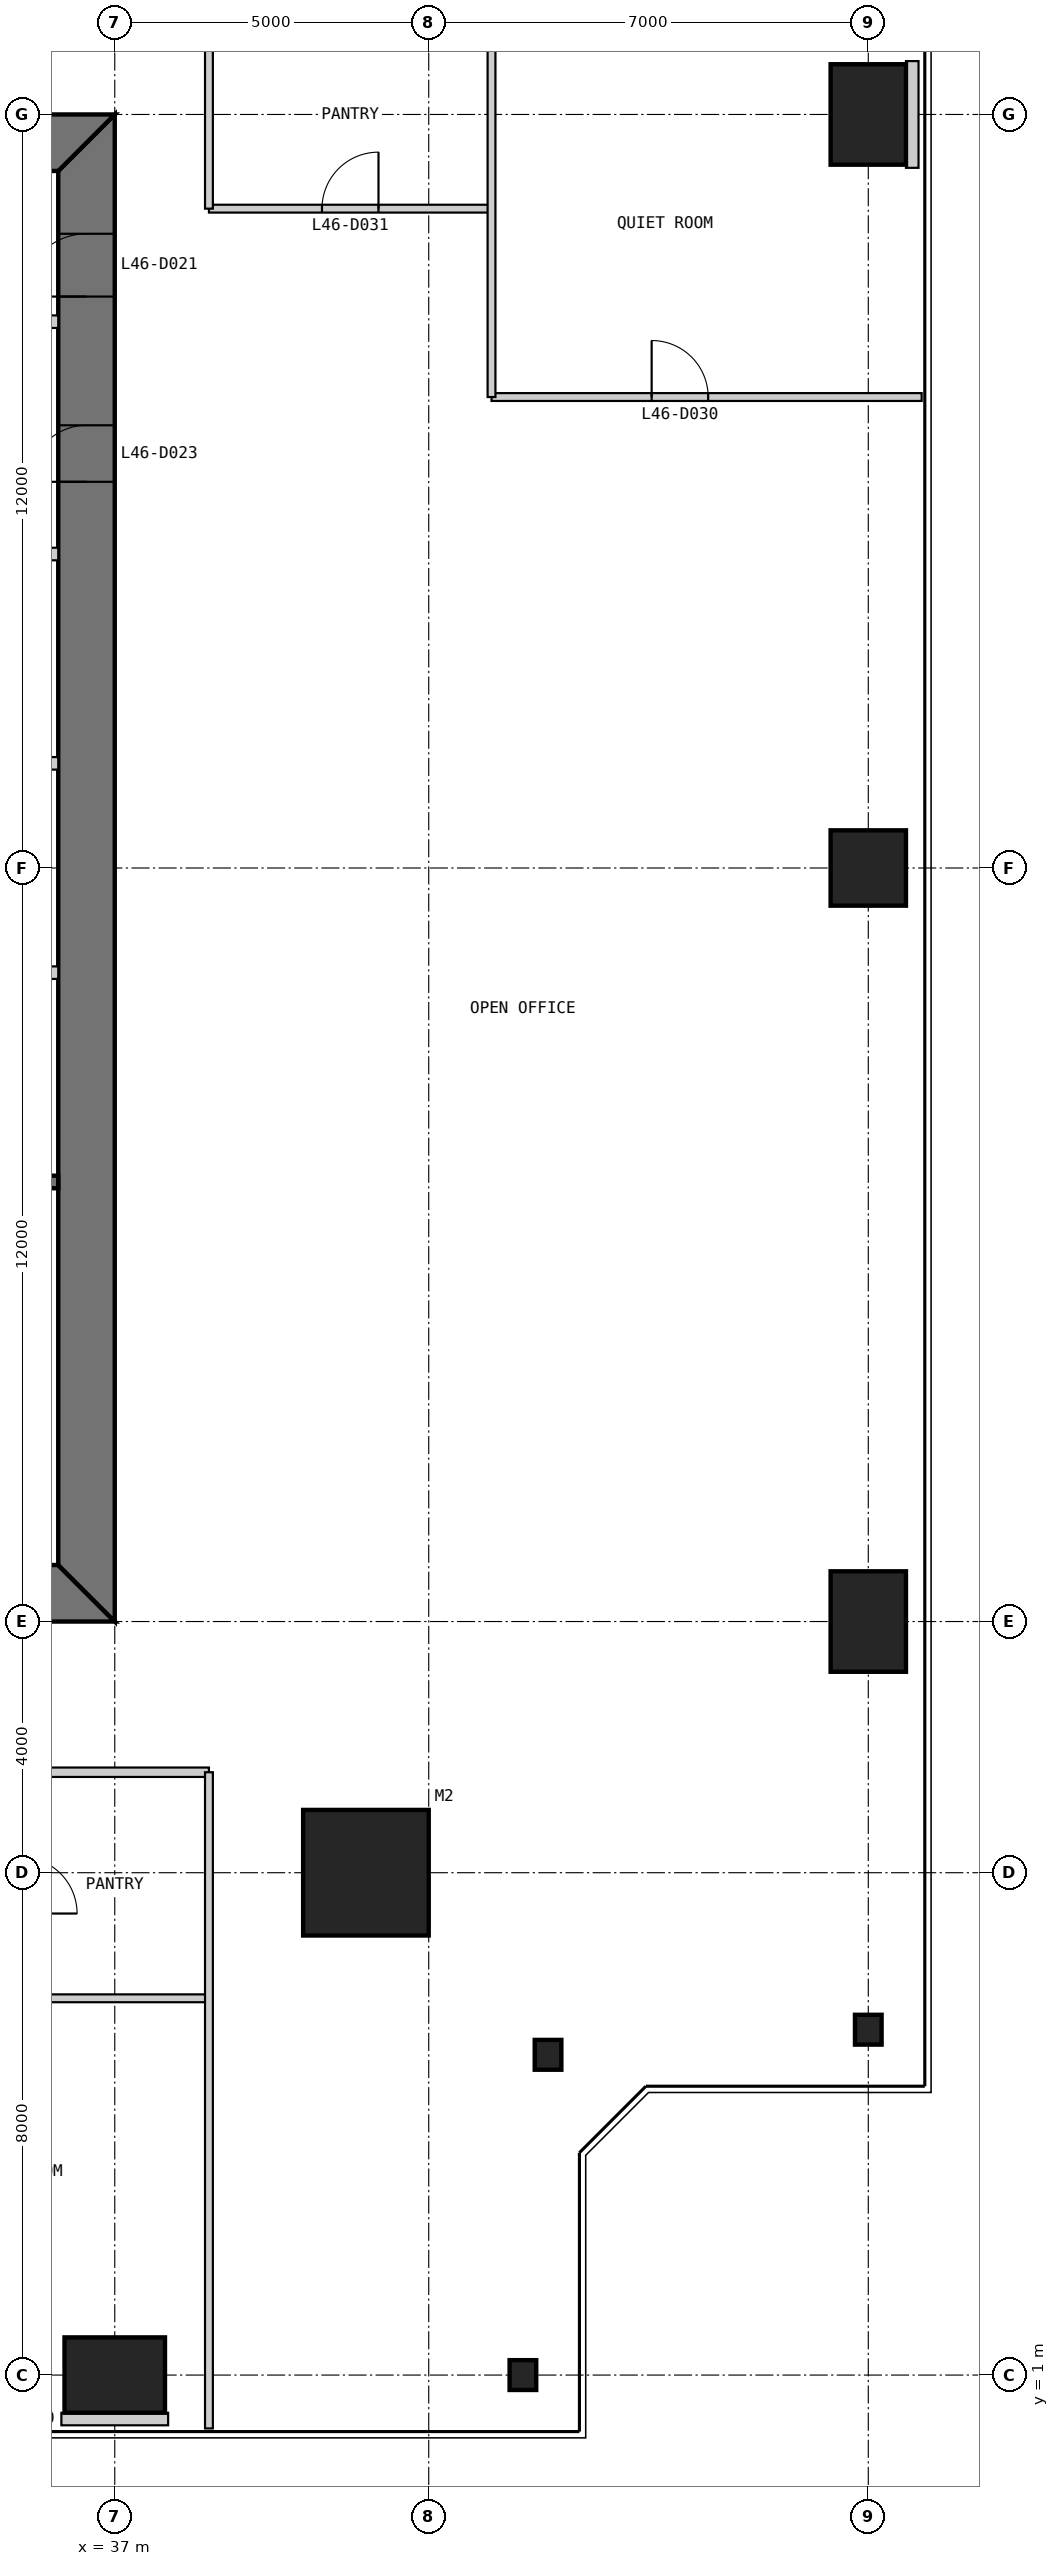
"""IFC4 building model, lengths in metres.
Left out: names, types, materials, properties, quantities, classifications, styles, units other than length and angle.
Written with IfcOpenShell. Run it as: python <this file> out.ifc"""

import sys

from ifc_helpers import new_model, si_unit, direction, frame, frame_2d, origin, origin_2d, place, context, subcontext, project, spatial, polyline, rectangle, i_section, outline, extrude, element, fill, save


model = new_model("IFC4")
c1 = context("Model", 3, precision=1e-05, world=origin(), true_north=direction((0.0, 1.0)))
c2 = subcontext(c1, "Body", "Model", "MODEL_VIEW")
j1 = project(units=[si_unit("LENGTHUNIT", "METRE"), si_unit("PLANEANGLEUNIT", "RADIAN")], contexts=[c1])
p1 = place(None, origin())
s1 = spatial("IfcSite", under=j1, at=p1, CompositionType="ELEMENT")
p2 = place(p1, origin())
s2 = spatial("IfcBuilding", under=s1, at=p2, CompositionType="ELEMENT")
p3 = place(p2, frame((0.0, 0.0, 197.8)))
s3 = spatial("IfcBuildingStorey", under=s2, at=p3, CompositionType="ELEMENT", Elevation=197.8)
p4 = place(p3, frame((41.0, 9.0, 0.0), z_axis=(0.0, 0.0, 1.0), x_axis=(1.0, 0.0, 0.0)))
e1 = element("IfcColumn", 1, at=p4, inside=s3, PredefinedType="COLUMN", context=c2, shape_type="SweptSolid", body=[
    extrude(rectangle(XDim=2.0, YDim=2.0, at=origin_2d()), origin(), (0.0, 0.0, 1.0), 4.0),
])
p5 = place(p3, frame((37.0, 1.0, 0.0), z_axis=(0.0, 0.0, 1.0), x_axis=(1.0, 0.0, 0.0)))
e2 = element("IfcColumn", 2, at=p5, inside=s3, PredefinedType="COLUMN", context=c2, shape_type="SweptSolid", body=[
    extrude(rectangle(XDim=1.6, YDim=1.2, at=origin_2d()), origin(), (0.0, 0.0, 1.0), 4.0),
])
for number, where, z_axis, x_axis in (
    (3, (43.5, 1.0, 0.0), (0.0, 0.0, 1.0), (1.0, 0.0, 0.0)),
    (4, (43.9, 6.1, 0.0), (0.0, 0.0, 1.0), (1.0, 0.0, 0.0)),
    (5, (49.0, 6.5, 0.0), (0.0, 0.0, 1.0), (1.0, 0.0, 0.0)),
):
    element("IfcColumn", number, at=place(p3, frame(where, z_axis=z_axis, x_axis=x_axis)), inside=s3, PredefinedType="COLUMN", context=c2, shape_type="SweptSolid", body=[
        extrude(i_section(OverallWidth=0.424, OverallDepth=0.475, WebThickness=0.048, FlangeThickness=0.077, at=origin_2d()), origin(), (0.0, 0.0, 1.0), 4.0),
    ])
p6 = place(p3, frame((49.0, 13.0, 0.0), z_axis=(0.0, 0.0, 1.0), x_axis=(1.0, 0.0, 0.0)))
e6 = element("IfcColumn", 6, at=p6, inside=s3, PredefinedType="COLUMN", context=c2, shape_type="SweptSolid", body=[
    extrude(rectangle(XDim=1.2, YDim=1.6, at=origin_2d()), origin(), (0.0, 0.0, 1.0), 4.0),
])
p7 = place(p3, frame((49.0, 25.0, 0.0), z_axis=(0.0, 0.0, 1.0), x_axis=(1.0, 0.0, 0.0)))
e7 = element("IfcColumn", 7, at=p7, inside=s3, PredefinedType="COLUMN", context=c2, shape_type="SweptSolid", body=[
    extrude(rectangle(XDim=1.2, YDim=1.2, at=origin_2d()), origin(), (0.0, 0.0, 1.0), 4.0),
])
p8 = place(p3, frame((49.0, 37.0, 0.0), z_axis=(0.0, 0.0, 1.0), x_axis=(1.0, 0.0, 0.0)))
e8 = element("IfcColumn", 8, at=p8, inside=s3, PredefinedType="COLUMN", context=c2, shape_type="SweptSolid", body=[
    extrude(rectangle(XDim=1.2, YDim=1.6, at=origin_2d()), origin(), (0.0, 0.0, 1.0), 4.0),
])
p9 = place(p3, frame((13.0, 13.45, 0.0), z_axis=(0.0, 0.0, 1.0), x_axis=(1.0, 0.0, 0.0)))
e9 = element("IfcWall", 9, at=p9, inside=s3, PredefinedType="SHEAR", context=c2, shape_type="SweptSolid", body=[
    extrude(outline(polyline([(0.0, -0.45), (24.0, -0.45), (23.1, 0.45), (0.9, 0.45), (0.0, -0.45)])), origin(), (0.0, 0.0, 1.0), 4.0),
])
p10 = place(p9, frame((4.9, 0.0, 0.0)))
e10 = element("IfcOpeningElement", 10, at=p10, cuts=e9, PredefinedType="OPENING", context=c2, shape_type="SweptSolid", body=[
    extrude(rectangle(XDim=1.0, YDim=2.2, at=frame_2d((0.5, 1.1))), frame((0.0, 0.46, 0.0), z_axis=(0.0, -1.0, 0.0), x_axis=(1.0, 0.0, 0.0)), (0.0, 0.0, 1.0), 0.92),
])
p11 = place(p9, frame((8.9, 0.0, 0.0)))
e11 = element("IfcOpeningElement", 11, at=p11, cuts=e9, PredefinedType="OPENING", context=c2, shape_type="SweptSolid", body=[
    extrude(rectangle(XDim=1.1, YDim=2.2, at=frame_2d((0.55, 1.1))), frame((0.0, 0.46, 0.0), z_axis=(0.0, -1.0, 0.0), x_axis=(1.0, 0.0, 0.0)), (0.0, 0.0, 1.0), 0.92),
])
p12 = place(p9, frame((15.05, 0.0, 0.0)))
e12 = element("IfcOpeningElement", 12, at=p12, cuts=e9, PredefinedType="OPENING", context=c2, shape_type="SweptSolid", body=[
    extrude(rectangle(XDim=0.9, YDim=2.2, at=frame_2d((0.45, 1.1))), frame((0.0, 0.46, 0.0), z_axis=(0.0, -1.0, 0.0), x_axis=(1.0, 0.0, 0.0)), (0.0, 0.0, 1.0), 0.92),
])
p13 = place(p9, frame((17.9, 0.0, 0.0)))
e13 = element("IfcOpeningElement", 13, at=p13, cuts=e9, PredefinedType="OPENING", context=c2, shape_type="SweptSolid", body=[
    extrude(rectangle(XDim=1.0, YDim=2.2, at=frame_2d((0.5, 1.1))), frame((0.0, 0.46, 0.0), z_axis=(0.0, -1.0, 0.0), x_axis=(1.0, 0.0, 0.0)), (0.0, 0.0, 1.0), 0.92),
])
p14 = place(p9, frame((21.4, 0.0, 0.0)))
e14 = element("IfcOpeningElement", 14, at=p14, cuts=e9, PredefinedType="OPENING", context=c2, shape_type="SweptSolid", body=[
    extrude(rectangle(XDim=1.0, YDim=2.2, at=frame_2d((0.5, 1.1))), frame((0.0, 0.46, 0.0), z_axis=(0.0, -1.0, 0.0), x_axis=(1.0, 0.0, 0.0)), (0.0, 0.0, 1.0), 0.92),
])
p15 = place(p3, frame((36.55, 13.9, 0.0), z_axis=(0.0, 0.0, 1.0), x_axis=(0.0, 1.0, 0.0)))
e15 = element("IfcWall", 15, at=p15, inside=s3, PredefinedType="SHEAR", context=c2, shape_type="SweptSolid", body=[
    extrude(outline(polyline([(-0.9, -0.45), (23.1, -0.45), (22.2, 0.45), (0.0, 0.45), (-0.9, -0.45)])), origin(), (0.0, 0.0, 1.0), 4.0),
])
p16 = place(p15, frame((20.2, 0.0, 0.0)))
e16 = element("IfcOpeningElement", 16, at=p16, cuts=e15, PredefinedType="OPENING", context=c2, shape_type="SweptSolid", body=[
    extrude(rectangle(XDim=1.0, YDim=2.2, at=frame_2d((0.5, 1.1))), frame((0.0, 0.46, 0.0), z_axis=(0.0, -1.0, 0.0), x_axis=(1.0, 0.0, 0.0)), (0.0, 0.0, 1.0), 0.92),
])
p17 = place(p15, frame((17.25, 0.0, 0.0)))
e17 = element("IfcOpeningElement", 17, at=p17, cuts=e15, PredefinedType="OPENING", context=c2, shape_type="SweptSolid", body=[
    extrude(rectangle(XDim=0.9, YDim=2.2, at=frame_2d((0.45, 1.1))), frame((0.0, 0.46, 0.0), z_axis=(0.0, -1.0, 0.0), x_axis=(1.0, 0.0, 0.0)), (0.0, 0.0, 1.0), 0.92),
])
p18 = place(p3, frame((37.0, 36.55, 0.0), z_axis=(0.0, 0.0, 1.0), x_axis=(-1.0, 0.0, 0.0)))
e18 = element("IfcWall", 18, at=p18, inside=s3, PredefinedType="SHEAR", context=c2, shape_type="SweptSolid", body=[
    extrude(outline(polyline([(0.0, -0.45), (24.0, -0.45), (23.1, 0.45), (0.9, 0.45), (0.0, -0.45)])), origin(), (0.0, 0.0, 1.0), 4.0),
])
p19 = place(p18, frame((4.9, 0.0, 0.0)))
e19 = element("IfcOpeningElement", 19, at=p19, cuts=e18, PredefinedType="OPENING", context=c2, shape_type="SweptSolid", body=[
    extrude(rectangle(XDim=1.0, YDim=2.2, at=frame_2d((0.5, 1.1))), frame((0.0, 0.46, 0.0), z_axis=(0.0, -1.0, 0.0), x_axis=(1.0, 0.0, 0.0)), (0.0, 0.0, 1.0), 0.92),
])
p20 = place(p18, frame((8.9, 0.0, 0.0)))
e20 = element("IfcOpeningElement", 20, at=p20, cuts=e18, PredefinedType="OPENING", context=c2, shape_type="SweptSolid", body=[
    extrude(rectangle(XDim=1.1, YDim=2.2, at=frame_2d((0.55, 1.1))), frame((0.0, 0.46, 0.0), z_axis=(0.0, -1.0, 0.0), x_axis=(1.0, 0.0, 0.0)), (0.0, 0.0, 1.0), 0.92),
])
p21 = place(p18, frame((15.05, 0.0, 0.0)))
e21 = element("IfcOpeningElement", 21, at=p21, cuts=e18, PredefinedType="OPENING", context=c2, shape_type="SweptSolid", body=[
    extrude(rectangle(XDim=0.9, YDim=2.2, at=frame_2d((0.45, 1.1))), frame((0.0, 0.46, 0.0), z_axis=(0.0, -1.0, 0.0), x_axis=(1.0, 0.0, 0.0)), (0.0, 0.0, 1.0), 0.92),
])
p22 = place(p18, frame((17.9, 0.0, 0.0)))
e22 = element("IfcOpeningElement", 22, at=p22, cuts=e18, PredefinedType="OPENING", context=c2, shape_type="SweptSolid", body=[
    extrude(rectangle(XDim=1.0, YDim=2.2, at=frame_2d((0.5, 1.1))), frame((0.0, 0.46, 0.0), z_axis=(0.0, -1.0, 0.0), x_axis=(1.0, 0.0, 0.0)), (0.0, 0.0, 1.0), 0.92),
])
p23 = place(p18, frame((21.4, 0.0, 0.0)))
e23 = element("IfcOpeningElement", 23, at=p23, cuts=e18, PredefinedType="OPENING", context=c2, shape_type="SweptSolid", body=[
    extrude(rectangle(XDim=1.0, YDim=2.2, at=frame_2d((0.5, 1.1))), frame((0.0, 0.46, 0.0), z_axis=(0.0, -1.0, 0.0), x_axis=(1.0, 0.0, 0.0)), (0.0, 0.0, 1.0), 0.92),
])
p24 = place(p3, frame((20.3, 20.0, 0.0), z_axis=(0.0, 0.0, 1.0), x_axis=(1.0, 0.0, 0.0)))
e24 = element("IfcWall", 24, at=p24, inside=s3, PredefinedType="SOLIDWALL", context=c2, shape_type="SweptSolid", body=[
    extrude(rectangle(XDim=15.8, YDim=0.2, at=frame_2d((7.9, 0.0))), origin(), (0.0, 0.0, 1.0), 3.8),
])
for number, where, z_axis, x_axis in (
    (25, (36.1, 30.0, 0.0), (0.0, 0.0, 1.0), (-1.0, 0.0, 0.0)),
    (26, (36.1, 26.667, 0.0), (0.0, 0.0, 1.0), (-1.0, 0.0, 0.0)),
    (27, (36.1, 23.333, 0.0), (0.0, 0.0, 1.0), (-1.0, 0.0, 0.0)),
    (28, (36.1, 33.7, 0.0), (0.0, 0.0, 1.0), (-1.0, 0.0, 0.0)),
):
    element("IfcWall", number, at=place(p3, frame(where, z_axis=z_axis, x_axis=x_axis)), inside=s3, PredefinedType="PARTITIONING", context=c2, shape_type="SweptSolid", body=[
        extrude(rectangle(XDim=2.8, YDim=0.2, at=frame_2d((1.4, 0.0))), origin(), (0.0, 0.0, 1.0), 3.8),
    ])
p25 = place(p3, frame((10.6, 10.6, 0.0), z_axis=(0.0, 0.0, 1.0), x_axis=(1.0, 0.0, 0.0)))
e29 = element("IfcWall", 29, at=p25, inside=s3, PredefinedType="PARTITIONING", context=c2, shape_type="SweptSolid", body=[
    extrude(rectangle(XDim=27.9, YDim=0.15, at=frame_2d((13.95, 0.0))), origin(), (0.0, 0.0, 1.0), 3.85),
])
p26 = place(p25, frame((4.15, 0.0, 0.0)))
e30 = element("IfcOpeningElement", 30, at=p26, cuts=e29, PredefinedType="OPENING", context=c2, shape_type="SweptSolid", body=[
    extrude(rectangle(XDim=1.0, YDim=2.2, at=frame_2d((0.5, 1.1))), frame((0.0, 0.085, 0.0), z_axis=(0.0, -1.0, 0.0), x_axis=(1.0, 0.0, 0.0)), (0.0, 0.0, 1.0), 0.17),
])
p27 = place(p25, frame((23.65, 0.0, 0.0)))
e31 = element("IfcOpeningElement", 31, at=p27, cuts=e29, PredefinedType="OPENING", context=c2, shape_type="SweptSolid", body=[
    extrude(rectangle(XDim=1.0, YDim=2.2, at=frame_2d((0.5, 1.1))), frame((0.0, 0.085, 0.0), z_axis=(0.0, -1.0, 0.0), x_axis=(1.0, 0.0, 0.0)), (0.0, 0.0, 1.0), 0.17),
])
p28 = place(p25, frame((1.15, 0.0, 0.0)))
e32 = element("IfcOpeningElement", 32, at=p28, cuts=e29, PredefinedType="OPENING", context=c2, shape_type="SweptSolid", body=[
    extrude(rectangle(XDim=1.0, YDim=2.2, at=frame_2d((0.5, 1.1))), frame((0.0, 0.085, 0.0), z_axis=(0.0, -1.0, 0.0), x_axis=(1.0, 0.0, 0.0)), (0.0, 0.0, 1.0), 0.17),
])
p29 = place(p3, frame((32.5, 7.0, 0.0), z_axis=(0.0, 0.0, 1.0), x_axis=(1.0, 0.0, 0.0)))
e33 = element("IfcWall", 33, at=p29, inside=s3, PredefinedType="PARTITIONING", context=c2, shape_type="SweptSolid", body=[
    extrude(rectangle(XDim=6.0, YDim=0.125, at=frame_2d((3.0, 0.0))), origin(), (0.0, 0.0, 1.0), 3.85),
])
p30 = place(p3, frame((38.5, 0.15, 0.0), z_axis=(0.0, 0.0, 1.0), x_axis=(0.0, 1.0, 0.0)))
e34 = element("IfcWall", 34, at=p30, inside=s3, PredefinedType="PARTITIONING", context=c2, shape_type="SweptSolid", body=[
    extrude(rectangle(XDim=10.45, YDim=0.125, at=frame_2d((5.225, 0.0))), origin(), (0.0, 0.0, 1.0), 3.85),
])
p31 = place(p3, frame((49.85, 32.5, 0.0), z_axis=(0.0, 0.0, 1.0), x_axis=(-1.0, 0.0, 0.0)))
e35 = element("IfcWall", 35, at=p31, inside=s3, PredefinedType="PARTITIONING", context=c2, shape_type="SweptSolid", body=[
    extrude(rectangle(XDim=6.85, YDim=0.125, at=frame_2d((3.425, 0.0))), origin(), (0.0, 0.0, 1.0), 3.85),
])
p32 = place(p31, frame((3.4, 0.0, 0.0)))
e36 = element("IfcOpeningElement", 36, at=p32, cuts=e35, PredefinedType="OPENING", context=c2, shape_type="SweptSolid", body=[
    extrude(rectangle(XDim=0.9, YDim=2.2, at=frame_2d((0.45, 1.1))), frame((0.0, 0.073, 0.0), z_axis=(0.0, -1.0, 0.0), x_axis=(1.0, 0.0, 0.0)), (0.0, 0.0, 1.0), 0.145),
])
p33 = place(p3, frame((43.0, 35.5, 0.0), z_axis=(0.0, 0.0, 1.0), x_axis=(-1.0, 0.0, 0.0)))
e37 = element("IfcWall", 37, at=p33, inside=s3, PredefinedType="PARTITIONING", context=c2, shape_type="SweptSolid", body=[
    extrude(rectangle(XDim=4.5, YDim=0.125, at=frame_2d((2.25, 0.0))), origin(), (0.0, 0.0, 1.0), 3.85),
])
p34 = place(p33, frame((1.8, 0.0, 0.0)))
e38 = element("IfcOpeningElement", 38, at=p34, cuts=e37, PredefinedType="OPENING", context=c2, shape_type="SweptSolid", body=[
    extrude(rectangle(XDim=0.9, YDim=2.2, at=frame_2d((0.45, 1.1))), frame((0.0, 0.073, 0.0), z_axis=(0.0, -1.0, 0.0), x_axis=(1.0, 0.0, 0.0)), (0.0, 0.0, 1.0), 0.145),
])
p35 = place(p3, frame((43.0, 32.5, 0.0), z_axis=(0.0, 0.0, 1.0), x_axis=(0.0, 1.0, 0.0)))
e39 = element("IfcWall", 39, at=p35, inside=s3, PredefinedType="PARTITIONING", context=c2, shape_type="SweptSolid", body=[
    extrude(rectangle(XDim=6.0, YDim=0.125, at=frame_2d((3.0, 0.0))), origin(), (0.0, 0.0, 1.0), 3.238),
])
p36 = place(p3, frame((38.5, 35.5, 0.0), z_axis=(0.0, 0.0, 1.0), x_axis=(0.0, 1.0, 0.0)))
e40 = element("IfcWall", 40, at=p36, inside=s3, PredefinedType="PARTITIONING", context=c2, shape_type="SweptSolid", body=[
    extrude(rectangle(XDim=3.0, YDim=0.125, at=frame_2d((1.5, 0.0))), origin(), (0.0, 0.0, 1.0), 3.85),
])
for number, where, z_axis, x_axis in (
    (41, (37.0, 0.2, 0.0), (0.0, 0.0, 1.0), (0.0, 1.0, 0.0)),
    (42, (49.8, 37.0, 0.0), (0.0, 0.0, 1.0), (-1.0, 0.0, 0.0)),
):
    element("IfcWall", number, at=place(p3, frame(where, z_axis=z_axis, x_axis=x_axis)), inside=s3, PredefinedType="PARTITIONING", context=c2, shape_type="SweptSolid", body=[
        extrude(rectangle(XDim=0.2, YDim=1.7, at=frame_2d((0.1, 0.0))), origin(), (0.0, 0.0, 1.0), 3.85),
    ])
p37 = place(p16, origin())
e43 = element("IfcDoor", 43, at=p37, inside=s3, OperationType="SINGLE_SWING_LEFT", PredefinedType="DOOR", context=c2, shape_type="SweptSolid", body=[
    extrude(rectangle(XDim=1.0, YDim=2.2, at=frame_2d((0.5, 1.1))), frame((0.0, 0.025, 0.0), z_axis=(0.0, -1.0, 0.0), x_axis=(1.0, 0.0, 0.0)), (0.0, 0.0, 1.0), 0.05),
    extrude(outline(polyline([(0.0, 0.0), (0.04, 0.0), (0.04, 2.16), (0.96, 2.16), (0.96, 0.0), (1.0, 0.0), (1.0, 2.2), (0.0, 2.2), (0.0, 0.0)])), frame((0.0, 0.3, 0.0), z_axis=(0.0, -1.0, 0.0), x_axis=(1.0, 0.0, 0.0)), (0.0, 0.0, 1.0), 0.6),
])
fill(e16, e43)
p38 = place(p17, origin())
e44 = element("IfcDoor", 44, at=p38, inside=s3, OperationType="SINGLE_SWING_LEFT", PredefinedType="DOOR", context=c2, shape_type="SweptSolid", body=[
    extrude(rectangle(XDim=0.9, YDim=2.2, at=frame_2d((0.45, 1.1))), frame((0.0, 0.025, 0.0), z_axis=(0.0, -1.0, 0.0), x_axis=(1.0, 0.0, 0.0)), (0.0, 0.0, 1.0), 0.05),
    extrude(outline(polyline([(0.0, 0.0), (0.04, 0.0), (0.04, 2.16), (0.86, 2.16), (0.86, 0.0), (0.9, 0.0), (0.9, 2.2), (0.0, 2.2), (0.0, 0.0)])), frame((0.0, 0.3, 0.0), z_axis=(0.0, -1.0, 0.0), x_axis=(1.0, 0.0, 0.0)), (0.0, 0.0, 1.0), 0.6),
])
fill(e17, e44)
p39 = place(p32, frame((0.9, 0.0, 0.0), z_axis=(0.0, 0.0, 1.0), x_axis=(-1.0, 0.0, 0.0)))
e45 = element("IfcDoor", 45, at=p39, inside=s3, OperationType="SINGLE_SWING_LEFT", PredefinedType="DOOR", context=c2, shape_type="SweptSolid", body=[
    extrude(rectangle(XDim=0.9, YDim=2.2, at=frame_2d((0.45, 1.1))), frame((0.0, 0.025, 0.0), z_axis=(0.0, -1.0, 0.0), x_axis=(1.0, 0.0, 0.0)), (0.0, 0.0, 1.0), 0.05),
])
fill(e36, e45)
p40 = place(p34, frame((0.9, 0.0, 0.0), z_axis=(0.0, 0.0, 1.0), x_axis=(-1.0, 0.0, 0.0)))
e46 = element("IfcDoor", 46, at=p40, inside=s3, OperationType="SINGLE_SWING_RIGHT", PredefinedType="DOOR", context=c2, shape_type="SweptSolid", body=[
    extrude(rectangle(XDim=0.9, YDim=2.2, at=frame_2d((0.45, 1.1))), frame((0.0, 0.025, 0.0), z_axis=(0.0, -1.0, 0.0), x_axis=(1.0, 0.0, 0.0)), (0.0, 0.0, 1.0), 0.05),
])
fill(e38, e46)
save(model, sys.argv[1])
